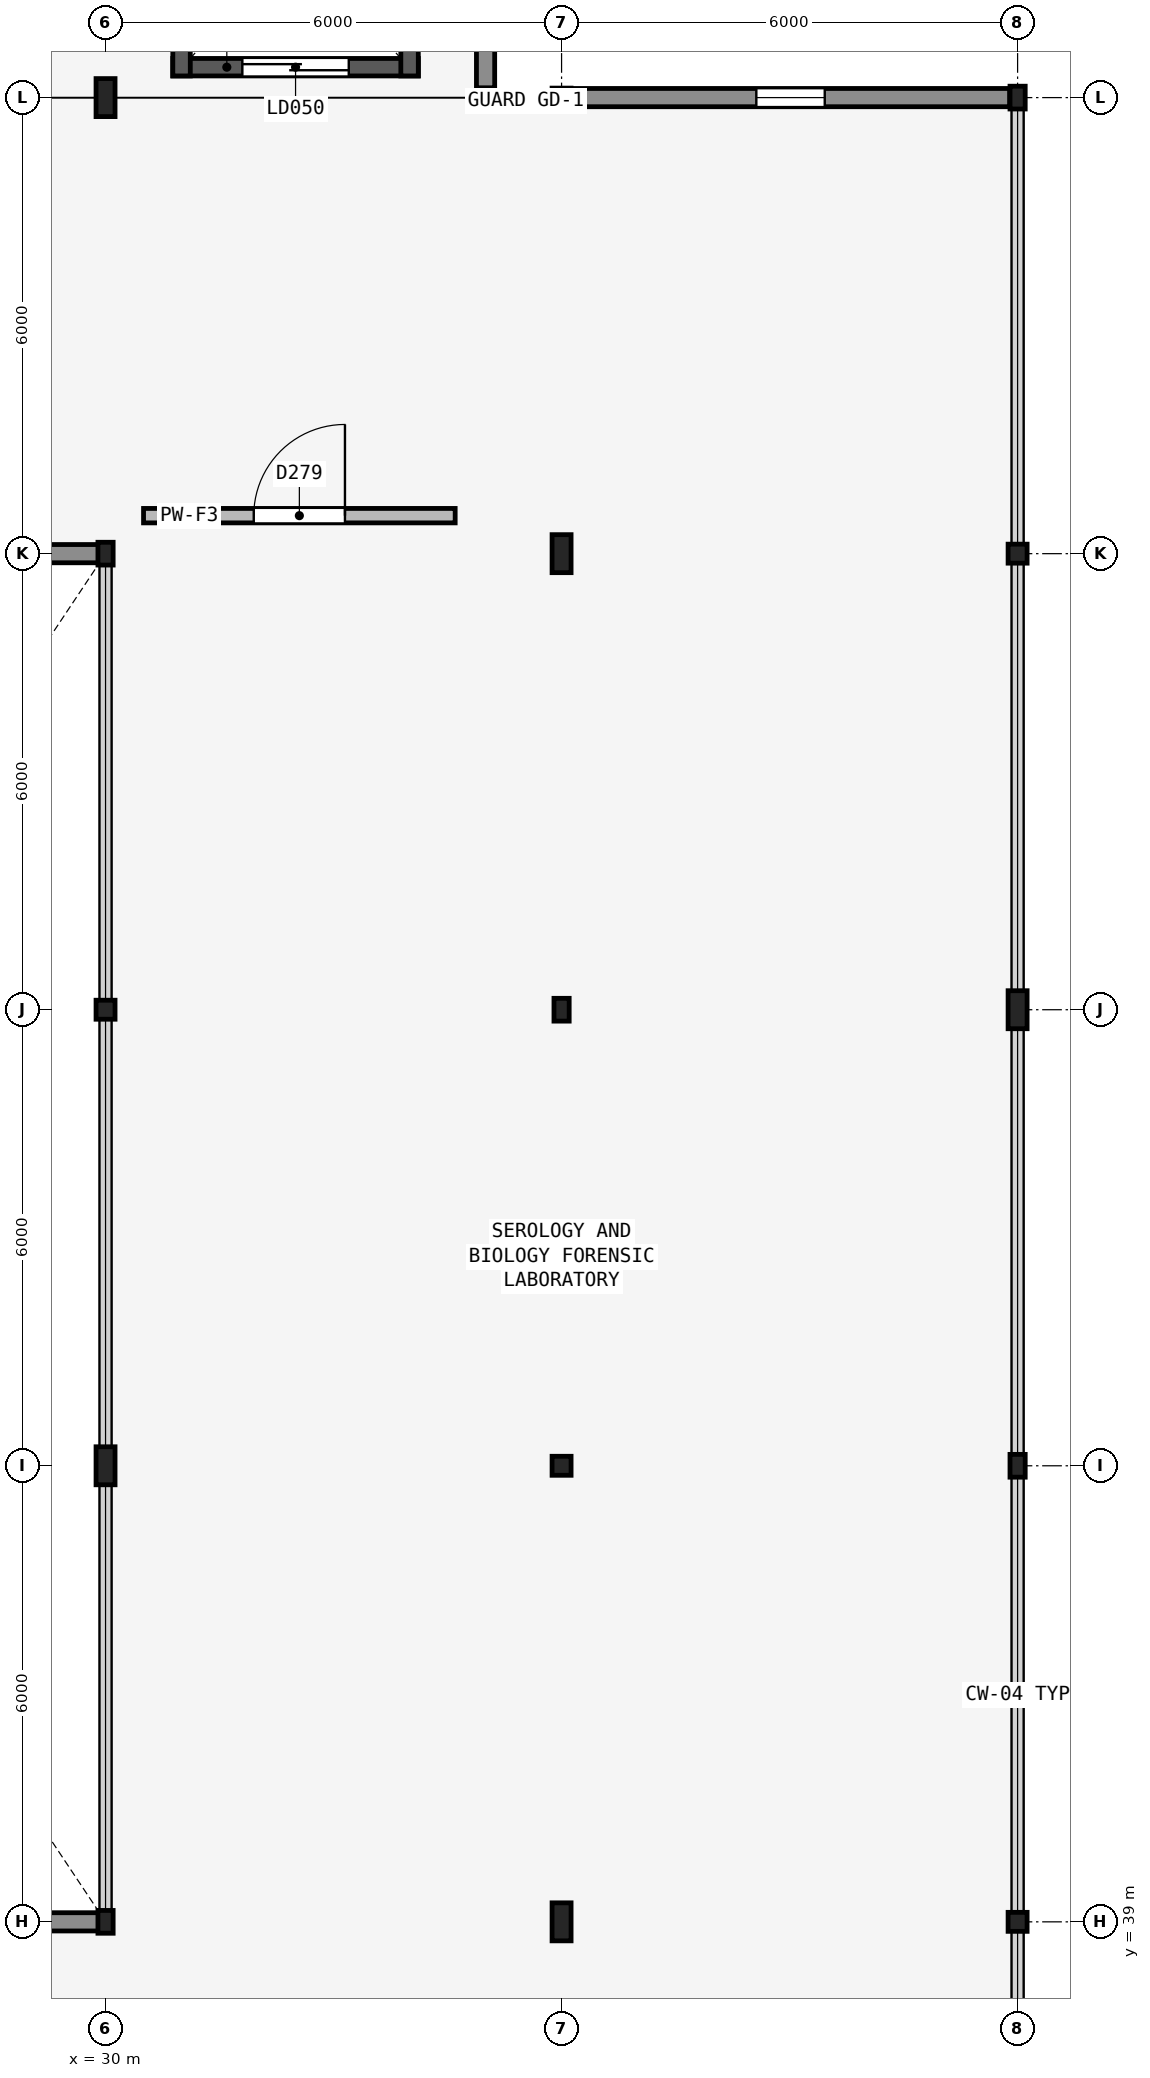
"""IFC4 building model, lengths in metres.
Left out: names, types, materials, properties, quantities, classifications, styles, units other than length and angle.
Written with IfcOpenShell. Run it as: python <this file> out.ifc"""

import sys

from ifc_helpers import new_model, si_unit, direction, frame, frame_2d, origin, origin_2d, place, context, subcontext, project, spatial, rectangle, hollow_rectangle, i_section, extrude, element, fill, save


model = new_model("IFC4")
c1 = context("Model", 3, precision=1e-05, world=origin(), true_north=direction((0.0, 1.0)))
c2 = subcontext(c1, "Body", "Model", "MODEL_VIEW")
j1 = project(units=[si_unit("LENGTHUNIT", "METRE"), si_unit("PLANEANGLEUNIT", "RADIAN")], contexts=[c1])
p1 = place(None, origin())
s1 = spatial("IfcSite", under=j1, at=p1, CompositionType="ELEMENT")
p2 = place(p1, origin())
s2 = spatial("IfcBuilding", under=s1, at=p2, CompositionType="ELEMENT")
p3 = place(p2, frame((0.0, 0.0, 22.2)))
s3 = spatial("IfcBuildingStorey", under=s2, at=p3, CompositionType="ELEMENT", Elevation=22.2)
p4 = place(p3, frame((30.0, 39.0, 0.0), z_axis=(0.0, 0.0, 1.0), x_axis=(1.0, 0.0, 0.0)))
e1 = element("IfcColumn", 1, at=p4, inside=s3, PredefinedType="COLUMN", context=c2, shape_type="SweptSolid", body=[
    extrude(hollow_rectangle(XDim=0.2, YDim=0.3, WallThickness=0.012, InnerFilletRadius=0.012, OuterFilletRadius=0.024, at=origin_2d()), origin(), (0.0, 0.0, 1.0), 3.9),
])
p5 = place(p3, frame((30.0, 45.0, 0.0), z_axis=(0.0, 0.0, 1.0), x_axis=(1.0, 0.0, 0.0)))
e2 = element("IfcColumn", 2, at=p5, inside=s3, PredefinedType="COLUMN", context=c2, shape_type="SweptSolid", body=[
    extrude(i_section(OverallWidth=0.25, OverallDepth=0.5, WebThickness=0.01, FlangeThickness=0.015, FilletRadius=0.015, at=origin_2d()), origin(), (0.0, 0.0, 1.0), 3.9),
])
p6 = place(p3, frame((30.0, 51.0, 0.0), z_axis=(0.0, 0.0, 1.0), x_axis=(1.0, 0.0, 0.0)))
e3 = element("IfcColumn", 3, at=p6, inside=s3, PredefinedType="COLUMN", context=c2, shape_type="SweptSolid", body=[
    extrude(hollow_rectangle(XDim=0.25, YDim=0.25, WallThickness=0.012, InnerFilletRadius=0.012, OuterFilletRadius=0.024, at=origin_2d()), origin(), (0.0, 0.0, 1.0), 3.9),
])
p7 = place(p3, frame((30.0, 57.0, 0.0), z_axis=(0.0, 0.0, 1.0), x_axis=(1.0, 0.0, 0.0)))
e4 = element("IfcColumn", 4, at=p7, inside=s3, PredefinedType="COLUMN", context=c2, shape_type="SweptSolid", body=[
    extrude(hollow_rectangle(XDim=0.2, YDim=0.3, WallThickness=0.012, InnerFilletRadius=0.012, OuterFilletRadius=0.024, at=origin_2d()), origin(), (0.0, 0.0, 1.0), 3.9),
])
for number, where, z_axis, x_axis in (
    (5, (30.0, 63.0, 0.0), (0.0, 0.0, 1.0), (1.0, 0.0, 0.0)),
    (6, (36.0, 39.0, 0.0), (0.0, 0.0, 1.0), (1.0, 0.0, 0.0)),
):
    element("IfcColumn", number, at=place(p3, frame(where, z_axis=z_axis, x_axis=x_axis)), inside=s3, PredefinedType="COLUMN", context=c2, shape_type="SweptSolid", body=[
        extrude(i_section(OverallWidth=0.25, OverallDepth=0.5, WebThickness=0.01, FlangeThickness=0.015, FilletRadius=0.015, at=origin_2d()), origin(), (0.0, 0.0, 1.0), 3.9),
    ])
p8 = place(p3, frame((36.0, 45.0, 0.0), z_axis=(0.0, 0.0, 1.0), x_axis=(1.0, 0.0, 0.0)))
e7 = element("IfcColumn", 7, at=p8, inside=s3, PredefinedType="COLUMN", context=c2, shape_type="SweptSolid", body=[
    extrude(hollow_rectangle(XDim=0.25, YDim=0.25, WallThickness=0.012, InnerFilletRadius=0.012, OuterFilletRadius=0.024, at=origin_2d()), origin(), (0.0, 0.0, 1.0), 3.9),
])
p9 = place(p3, frame((36.0, 51.0, 0.0), z_axis=(0.0, 0.0, 1.0), x_axis=(1.0, 0.0, 0.0)))
e8 = element("IfcColumn", 8, at=p9, inside=s3, PredefinedType="COLUMN", context=c2, shape_type="SweptSolid", body=[
    extrude(hollow_rectangle(XDim=0.2, YDim=0.3, WallThickness=0.012, InnerFilletRadius=0.012, OuterFilletRadius=0.024, at=origin_2d()), origin(), (0.0, 0.0, 1.0), 3.9),
])
p10 = place(p3, frame((36.0, 57.0, 0.0), z_axis=(0.0, 0.0, 1.0), x_axis=(1.0, 0.0, 0.0)))
e9 = element("IfcColumn", 9, at=p10, inside=s3, PredefinedType="COLUMN", context=c2, shape_type="SweptSolid", body=[
    extrude(i_section(OverallWidth=0.25, OverallDepth=0.5, WebThickness=0.01, FlangeThickness=0.015, FilletRadius=0.015, at=origin_2d()), origin(), (0.0, 0.0, 1.0), 3.9),
])
for number, where, z_axis, x_axis in (
    (10, (36.0, 63.0, 0.0), (0.0, 0.0, 1.0), (1.0, 0.0, 0.0)),
    (11, (42.0, 39.0, 0.0), (0.0, 0.0, 1.0), (1.0, 0.0, 0.0)),
):
    element("IfcColumn", number, at=place(p3, frame(where, z_axis=z_axis, x_axis=x_axis)), inside=s3, PredefinedType="COLUMN", context=c2, shape_type="SweptSolid", body=[
        extrude(hollow_rectangle(XDim=0.25, YDim=0.25, WallThickness=0.012, InnerFilletRadius=0.012, OuterFilletRadius=0.024, at=origin_2d()), origin(), (0.0, 0.0, 1.0), 3.9),
    ])
p11 = place(p3, frame((42.0, 45.0, 0.0), z_axis=(0.0, 0.0, 1.0), x_axis=(1.0, 0.0, 0.0)))
e12 = element("IfcColumn", 12, at=p11, inside=s3, PredefinedType="COLUMN", context=c2, shape_type="SweptSolid", body=[
    extrude(hollow_rectangle(XDim=0.2, YDim=0.3, WallThickness=0.012, InnerFilletRadius=0.012, OuterFilletRadius=0.024, at=origin_2d()), origin(), (0.0, 0.0, 1.0), 3.9),
])
p12 = place(p3, frame((42.0, 51.0, 0.0), z_axis=(0.0, 0.0, 1.0), x_axis=(1.0, 0.0, 0.0)))
e13 = element("IfcColumn", 13, at=p12, inside=s3, PredefinedType="COLUMN", context=c2, shape_type="SweptSolid", body=[
    extrude(i_section(OverallWidth=0.25, OverallDepth=0.5, WebThickness=0.01, FlangeThickness=0.015, FilletRadius=0.015, at=origin_2d()), origin(), (0.0, 0.0, 1.0), 3.9),
])
p13 = place(p3, frame((42.0, 57.0, 0.0), z_axis=(0.0, 0.0, 1.0), x_axis=(1.0, 0.0, 0.0)))
e14 = element("IfcColumn", 14, at=p13, inside=s3, PredefinedType="COLUMN", context=c2, shape_type="SweptSolid", body=[
    extrude(hollow_rectangle(XDim=0.25, YDim=0.25, WallThickness=0.012, InnerFilletRadius=0.012, OuterFilletRadius=0.024, at=origin_2d()), origin(), (0.0, 0.0, 1.0), 3.9),
])
p14 = place(p3, frame((42.0, 63.0, 0.0), z_axis=(0.0, 0.0, 1.0), x_axis=(1.0, 0.0, 0.0)))
e15 = element("IfcColumn", 15, at=p14, inside=s3, PredefinedType="COLUMN", context=c2, shape_type="SweptSolid", body=[
    extrude(hollow_rectangle(XDim=0.2, YDim=0.3, WallThickness=0.012, InnerFilletRadius=0.012, OuterFilletRadius=0.024, at=origin_2d()), origin(), (0.0, 0.0, 1.0), 3.9),
])
p15 = place(p3, frame((36.129, 63.0, 0.0), z_axis=(0.0, 0.0, 1.0), x_axis=(1.0, 0.0, 0.0)))
e16 = element("IfcWall", 16, at=p15, inside=s3, PredefinedType="SOLIDWALL", context=c2, shape_type="SweptSolid", body=[
    extrude(rectangle(XDim=5.767, YDim=0.24, at=frame_2d((2.884, 0.0))), origin(), (0.0, 0.0, 1.0), 3.08),
])
p16 = place(p15, frame((2.434, 0.0, 1.0)))
e17 = element("IfcOpeningElement", 17, at=p16, cuts=e16, PredefinedType="OPENING", context=c2, shape_type="SweptSolid", body=[
    extrude(rectangle(XDim=0.9, YDim=1.5, at=frame_2d((0.45, 0.75))), frame((0.0, 0.13, 0.0), z_axis=(0.0, -1.0, 0.0), x_axis=(1.0, 0.0, 0.0)), (0.0, 0.0, 1.0), 0.26),
])
p17 = place(p3, frame((24.0, 39.0, 0.0), z_axis=(0.0, 0.0, 1.0), x_axis=(1.0, 0.0, 0.0)))
e18 = element("IfcWall", 18, at=p17, inside=s3, PredefinedType="SOLIDWALL", context=c2, shape_type="SweptSolid", body=[
    extrude(rectangle(XDim=5.95, YDim=0.24, at=frame_2d((2.975, 0.0))), origin(), (0.0, 0.0, 1.0), 3.23),
])
p18 = place(p17, frame((2.275, 0.0, 0.85)))
e19 = element("IfcOpeningElement", 19, at=p18, cuts=e18, PredefinedType="OPENING", context=c2, shape_type="SweptSolid", body=[
    extrude(rectangle(XDim=1.4, YDim=1.8, at=frame_2d((0.7, 0.9))), frame((0.0, 0.13, 0.0), z_axis=(0.0, -1.0, 0.0), x_axis=(1.0, 0.0, 0.0)), (0.0, 0.0, 1.0), 0.26),
])
p19 = place(p3, frame((24.0, 57.0, 0.0), z_axis=(0.0, 0.0, 1.0), x_axis=(1.0, 0.0, 0.0)))
e20 = element("IfcWall", 20, at=p19, inside=s3, PredefinedType="SOLIDWALL", context=c2, shape_type="SweptSolid", body=[
    extrude(rectangle(XDim=5.95, YDim=0.24, at=frame_2d((2.975, 0.0))), origin(), (0.0, 0.0, 1.0), 3.13),
])
p20 = place(p19, frame((2.275, 0.0, 0.85)))
e21 = element("IfcOpeningElement", 21, at=p20, cuts=e20, PredefinedType="OPENING", context=c2, shape_type="SweptSolid", body=[
    extrude(rectangle(XDim=1.4, YDim=1.8, at=frame_2d((0.7, 0.9))), frame((0.0, 0.13, 0.0), z_axis=(0.0, -1.0, 0.0), x_axis=(1.0, 0.0, 0.0)), (0.0, 0.0, 1.0), 0.26),
])
p21 = place(p3, frame((35.0, 63.129, 0.0), z_axis=(0.0, 0.0, 1.0), x_axis=(0.0, 1.0, 0.0)))
e22 = element("IfcWall", 22, at=p21, inside=s3, PredefinedType="SOLIDWALL", context=c2, shape_type="SweptSolid", body=[
    extrude(rectangle(XDim=11.746, YDim=0.24, at=frame_2d((5.873, 0.0))), origin(), (0.0, 0.0, 1.0), 3.28),
])
p22 = place(p3, frame((30.885, 63.4, 0.0), z_axis=(0.0, 0.0, 1.0), x_axis=(1.0, 0.0, 0.0)))
e23 = element("IfcWall", 23, at=p22, inside=s3, PredefinedType="SHEAR", context=c2, shape_type="SweptSolid", body=[
    extrude(rectangle(XDim=3.23, YDim=0.23, at=frame_2d((1.615, 0.0))), origin(), (0.0, 0.0, 1.0), 3.9),
])
p23 = place(p22, frame((0.915, 0.0, 0.0)))
e24 = element("IfcOpeningElement", 24, at=p23, cuts=e23, PredefinedType="OPENING", context=c2, shape_type="SweptSolid", body=[
    extrude(rectangle(XDim=1.4, YDim=2.3, at=frame_2d((0.7, 1.15))), frame((0.0, 0.125, 0.0), z_axis=(0.0, -1.0, 0.0), x_axis=(1.0, 0.0, 0.0)), (0.0, 0.0, 1.0), 0.25),
])
for number, where, z_axis, x_axis in (
    (25, (34.0, 63.285, 0.0), (0.0, 0.0, 1.0), (0.0, 1.0, 0.0)),
    (26, (31.0, 66.915, 0.0), (0.0, 0.0, 1.0), (0.0, -1.0, 0.0)),
):
    element("IfcWall", number, at=place(p3, frame(where, z_axis=z_axis, x_axis=x_axis)), inside=s3, PredefinedType="SHEAR", context=c2, shape_type="SweptSolid", body=[
        extrude(rectangle(XDim=3.63, YDim=0.23, at=frame_2d((1.815, 0.0))), origin(), (0.0, 0.0, 1.0), 3.9),
    ])
p24 = place(p3, frame((30.5, 57.5, 0.0), z_axis=(0.0, 0.0, 1.0), x_axis=(1.0, 0.0, 0.0)))
e27 = element("IfcWall", 27, at=p24, inside=s3, PredefinedType="PARTITIONING", context=c2, shape_type="SweptSolid", body=[
    extrude(rectangle(XDim=4.1, YDim=0.19, at=frame_2d((2.05, 0.0))), origin(), (0.0, 0.0, 1.0), 3.38),
])
p25 = place(p24, frame((1.45, 0.0, 0.0)))
e28 = element("IfcOpeningElement", 28, at=p25, cuts=e27, PredefinedType="OPENING", context=c2, shape_type="SweptSolid", body=[
    extrude(rectangle(XDim=1.2, YDim=2.15, at=frame_2d((0.6, 1.075))), frame((0.0, 0.105, 0.0), z_axis=(0.0, -1.0, 0.0), x_axis=(1.0, 0.0, 0.0)), (0.0, 0.0, 1.0), 0.21),
])
p26 = place(p16, origin())
e29 = element("IfcWindow", 29, at=p26, inside=s3, PartitioningType="SINGLE_PANEL", PredefinedType="WINDOW", context=c2, shape_type="SweptSolid", body=[
    extrude(rectangle(XDim=0.9, YDim=1.5, at=frame_2d((0.45, 0.75))), frame((0.0, 0.03, 0.0), z_axis=(0.0, -1.0, 0.0), x_axis=(1.0, 0.0, 0.0)), (0.0, 0.0, 1.0), 0.06),
])
fill(e17, e29)
p27 = place(p23, origin())
e30 = element("IfcDoor", 30, at=p27, inside=s3, OperationType="SLIDING_TO_LEFT", PredefinedType="DOOR", context=c2, shape_type="SweptSolid", body=[
    extrude(rectangle(XDim=1.4, YDim=2.3, at=frame_2d((0.7, 1.15))), frame((0.0, 0.025, 0.0), z_axis=(0.0, -1.0, 0.0), x_axis=(1.0, 0.0, 0.0)), (0.0, 0.0, 1.0), 0.05),
])
fill(e24, e30)
p28 = place(p25, origin())
e31 = element("IfcDoor", 31, at=p28, inside=s3, OperationType="SINGLE_SWING_RIGHT", PredefinedType="DOOR", context=c2, shape_type="SweptSolid", body=[
    extrude(rectangle(XDim=1.2, YDim=2.15, at=frame_2d((0.6, 1.075))), frame((0.0, 0.025, 0.0), z_axis=(0.0, -1.0, 0.0), x_axis=(1.0, 0.0, 0.0)), (0.0, 0.0, 1.0), 0.05),
])
fill(e28, e31)
save(model, sys.argv[1])
